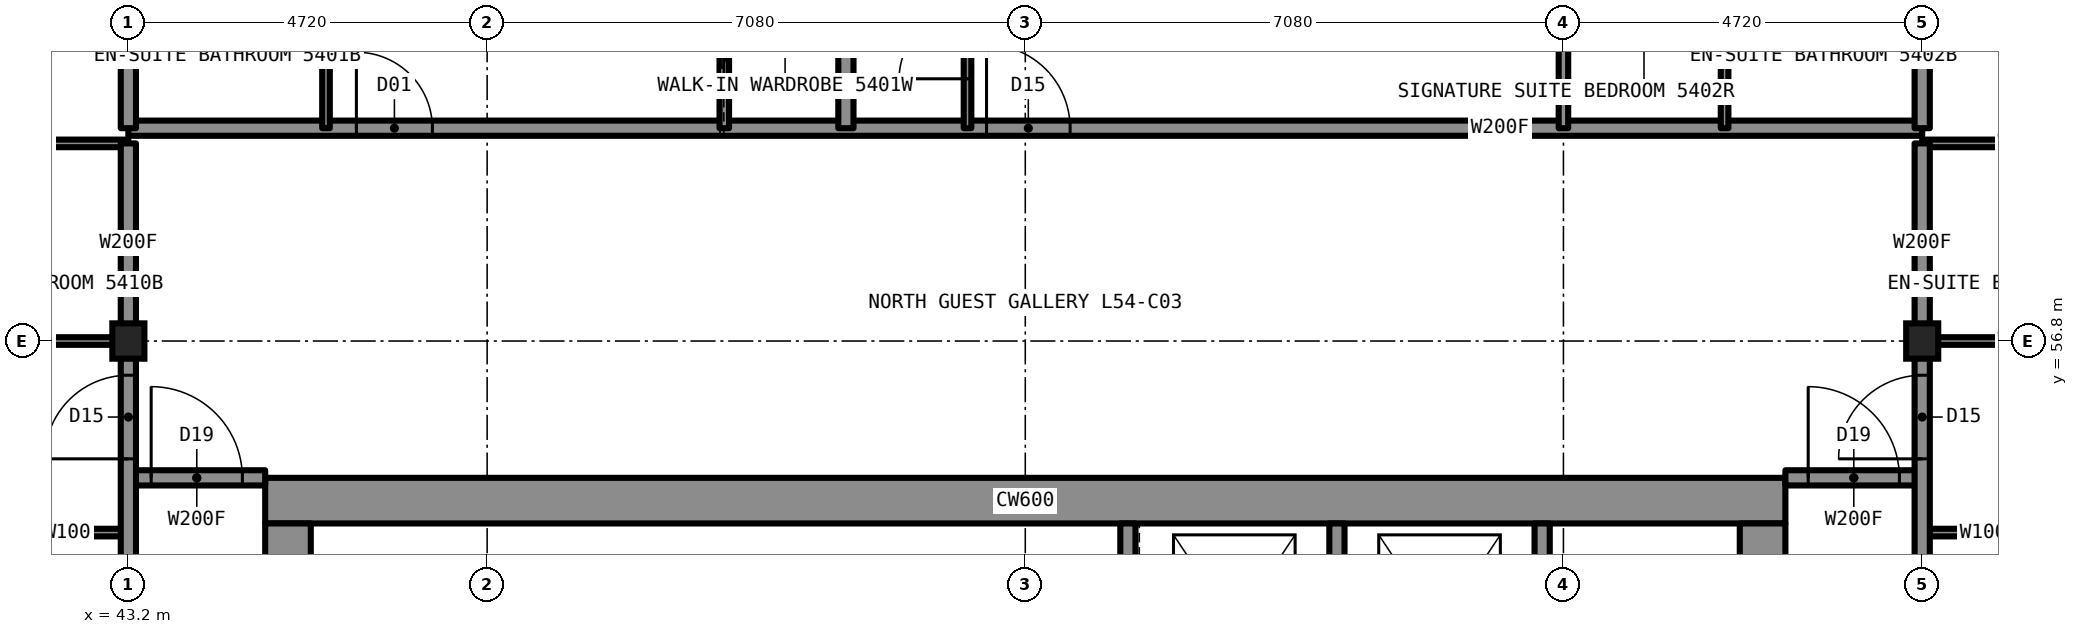
"""IFC4 building model, lengths in metres.
Left out: names, types, materials, properties, quantities, classifications, styles, units other than length and angle.
Written with IfcOpenShell. Run it as: python <this file> out.ifc"""

import sys

from ifc_helpers import new_model, si_unit, direction, frame, frame_2d, origin, origin_2d, place, context, subcontext, project, spatial, rectangle, i_section, extrude, element, fill, save


model = new_model("IFC4")
c1 = context("Model", 3, precision=1e-05, world=origin(), true_north=direction((0.0, 1.0)))
c2 = subcontext(c1, "Body", "Model", "MODEL_VIEW")
j1 = project(units=[si_unit("LENGTHUNIT", "METRE"), si_unit("PLANEANGLEUNIT", "RADIAN")], contexts=[c1])
p1 = place(None, origin())
s1 = spatial("IfcSite", under=j1, at=p1, CompositionType="ELEMENT")
p2 = place(p1, origin())
s2 = spatial("IfcBuilding", under=s1, at=p2, CompositionType="ELEMENT")
p3 = place(p2, frame((0.0, 0.0, 193.3)))
s3 = spatial("IfcBuildingStorey", under=s2, at=p3, CompositionType="ELEMENT", Elevation=193.3)
for number, where, z_axis, x_axis in (
    (1, (43.2, 56.8, 0.0), (0.0, 0.0, 1.0), (1.0, 0.0, 0.0)),
    (2, (66.8, 56.8, 0.0), (0.0, 0.0, 1.0), (1.0, 0.0, 0.0)),
):
    element("IfcColumn", number, at=place(p3, frame(where, z_axis=z_axis, x_axis=x_axis)), inside=s3, PredefinedType="COLUMN", context=c2, shape_type="SweptSolid", body=[
        extrude(i_section(OverallWidth=0.422, OverallDepth=0.465, WebThickness=0.045, FlangeThickness=0.073, at=origin_2d()), origin(), (0.0, 0.0, 1.0), 3.5),
    ])
p4 = place(p3, frame((45.0, 54.7, 0.0), z_axis=(0.0, 0.0, 1.0), x_axis=(1.0, 0.0, 0.0)))
e3 = element("IfcWall", 3, at=p4, inside=s3, PredefinedType="SHEAR", context=c2, shape_type="SweptSolid", body=[
    extrude(rectangle(XDim=20.0, YDim=0.6, at=frame_2d((10.0, 0.0))), origin(), (0.0, 0.0, 1.0), 3.5),
])
p5 = place(p3, frame((64.7, 35.6, 0.0), z_axis=(0.0, 0.0, 1.0), x_axis=(0.0, 1.0, 0.0)))
e4 = element("IfcWall", 4, at=p5, inside=s3, PredefinedType="SHEAR", context=c2, shape_type="SweptSolid", body=[
    extrude(rectangle(XDim=18.8, YDim=0.6, at=frame_2d((9.4, 0.0))), origin(), (0.0, 0.0, 1.0), 3.5),
])
p6 = place(p5, frame((13.4, 0.0, 0.0)))
e5 = element("IfcOpeningElement", 5, at=p6, cuts=e4, PredefinedType="OPENING", context=c2, shape_type="SweptSolid", body=[
    extrude(rectangle(XDim=1.8, YDim=2.2, at=frame_2d((0.9, 1.1))), frame((0.0, 0.31, 0.0), z_axis=(0.0, -1.0, 0.0), x_axis=(1.0, 0.0, 0.0)), (0.0, 0.0, 1.0), 0.62),
])
p7 = place(p5, frame((3.6, 0.0, 0.0)))
e6 = element("IfcOpeningElement", 6, at=p7, cuts=e4, PredefinedType="OPENING", context=c2, shape_type="SweptSolid", body=[
    extrude(rectangle(XDim=1.8, YDim=2.2, at=frame_2d((0.9, 1.1))), frame((0.0, 0.31, 0.0), z_axis=(0.0, -1.0, 0.0), x_axis=(1.0, 0.0, 0.0)), (0.0, 0.0, 1.0), 0.62),
])
p8 = place(p3, frame((45.3, 35.6, 0.0), z_axis=(0.0, 0.0, 1.0), x_axis=(0.0, 1.0, 0.0)))
e7 = element("IfcWall", 7, at=p8, inside=s3, PredefinedType="SHEAR", context=c2, shape_type="SweptSolid", body=[
    extrude(rectangle(XDim=18.8, YDim=0.6, at=frame_2d((9.4, 0.0))), origin(), (0.0, 0.0, 1.0), 3.5),
])
p9 = place(p8, frame((13.4, 0.0, 0.0)))
e8 = element("IfcOpeningElement", 8, at=p9, cuts=e7, PredefinedType="OPENING", context=c2, shape_type="SweptSolid", body=[
    extrude(rectangle(XDim=1.8, YDim=2.2, at=frame_2d((0.9, 1.1))), frame((0.0, 0.31, 0.0), z_axis=(0.0, -1.0, 0.0), x_axis=(1.0, 0.0, 0.0)), (0.0, 0.0, 1.0), 0.62),
])
p10 = place(p8, frame((3.6, 0.0, 0.0)))
e9 = element("IfcOpeningElement", 9, at=p10, cuts=e7, PredefinedType="OPENING", context=c2, shape_type="SweptSolid", body=[
    extrude(rectangle(XDim=1.8, YDim=2.2, at=frame_2d((0.9, 1.1))), frame((0.0, 0.31, 0.0), z_axis=(0.0, -1.0, 0.0), x_axis=(1.0, 0.0, 0.0)), (0.0, 0.0, 1.0), 0.62),
])
p11 = place(p8, frame((6.4, 0.0, 0.0)))
e10 = element("IfcOpeningElement", 10, at=p11, cuts=e7, PredefinedType="OPENING", context=c2, shape_type="SweptSolid", body=[
    extrude(rectangle(XDim=1.2, YDim=2.2, at=frame_2d((0.6, 1.1))), frame((0.0, 0.31, 0.0), z_axis=(0.0, -1.0, 0.0), x_axis=(1.0, 0.0, 0.0)), (0.0, 0.0, 1.0), 0.62),
])
p12 = place(p3, frame((43.2, 55.0, 0.0), z_axis=(0.0, 0.0, 1.0), x_axis=(1.0, 0.0, 0.0)))
e11 = element("IfcWall", 11, at=p12, inside=s3, PredefinedType="PARTITIONING", context=c2, shape_type="SweptSolid", body=[
    extrude(rectangle(XDim=1.8, YDim=0.2, at=frame_2d((0.9, 0.0))), origin(), (0.0, 0.0, 1.0), 3.33),
])
p13 = place(p12, frame((0.3, 0.0, 0.0)))
e12 = element("IfcOpeningElement", 12, at=p13, cuts=e11, PredefinedType="OPENING", context=c2, shape_type="SweptSolid", body=[
    extrude(rectangle(XDim=1.2, YDim=2.2, at=frame_2d((0.6, 1.1))), frame((0.0, 0.11, 0.0), z_axis=(0.0, -1.0, 0.0), x_axis=(1.0, 0.0, 0.0)), (0.0, 0.0, 1.0), 0.22),
])
p14 = place(p3, frame((65.0, 55.0, 0.0), z_axis=(0.0, 0.0, 1.0), x_axis=(1.0, 0.0, 0.0)))
e13 = element("IfcWall", 13, at=p14, inside=s3, PredefinedType="PARTITIONING", context=c2, shape_type="SweptSolid", body=[
    extrude(rectangle(XDim=1.8, YDim=0.2, at=frame_2d((0.9, 0.0))), origin(), (0.0, 0.0, 1.0), 3.33),
])
p15 = place(p14, frame((0.3, 0.0, 0.0)))
e14 = element("IfcOpeningElement", 14, at=p15, cuts=e13, PredefinedType="OPENING", context=c2, shape_type="SweptSolid", body=[
    extrude(rectangle(XDim=1.2, YDim=2.2, at=frame_2d((0.6, 1.1))), frame((0.0, 0.11, 0.0), z_axis=(0.0, -1.0, 0.0), x_axis=(1.0, 0.0, 0.0)), (0.0, 0.0, 1.0), 0.22),
])
for number, where, z_axis, x_axis in (
    (15, (40.6, 56.8, 0.0), (0.0, 0.0, 1.0), (1.0, 0.0, 0.0)),
    (16, (66.8, 56.8, 0.0), (0.0, 0.0, 1.0), (1.0, 0.0, 0.0)),
):
    element("IfcWall", number, at=place(p3, frame(where, z_axis=z_axis, x_axis=x_axis)), inside=s3, PredefinedType="PARTITIONING", context=c2, shape_type="SweptSolid", body=[
        extrude(rectangle(XDim=2.6, YDim=0.1, at=frame_2d((1.3, 0.0))), origin(), (0.0, 0.0, 1.0), 2.573),
    ])
for number, where, z_axis, x_axis in (
    (17, (40.6, 59.4, 0.0), (0.0, 0.0, 1.0), (1.0, 0.0, 0.0)),
    (18, (66.8, 59.4, 0.0), (0.0, 0.0, 1.0), (1.0, 0.0, 0.0)),
):
    element("IfcWall", number, at=place(p3, frame(where, z_axis=z_axis, x_axis=x_axis)), inside=s3, PredefinedType="PARTITIONING", context=c2, shape_type="SweptSolid", body=[
        extrude(rectangle(XDim=2.6, YDim=0.1, at=frame_2d((1.3, 0.0))), origin(), (0.0, 0.0, 1.0), 3.33),
    ])
p16 = place(p3, frame((43.2, 59.6, 0.0), z_axis=(0.0, 0.0, 1.0), x_axis=(1.0, 0.0, 0.0)))
e19 = element("IfcWall", 19, at=p16, inside=s3, PredefinedType="PARTITIONING", context=c2, shape_type="SweptSolid", body=[
    extrude(rectangle(XDim=23.6, YDim=0.2, at=frame_2d((11.8, 0.0))), origin(), (0.0, 0.0, 1.0), 3.33),
])
p17 = place(p16, frame((3.0, 0.0, 0.0)))
e20 = element("IfcOpeningElement", 20, at=p17, cuts=e19, PredefinedType="OPENING", context=c2, shape_type="SweptSolid", body=[
    extrude(rectangle(XDim=1.0, YDim=2.2, at=frame_2d((0.5, 1.1))), frame((0.0, 0.11, 0.0), z_axis=(0.0, -1.0, 0.0), x_axis=(1.0, 0.0, 0.0)), (0.0, 0.0, 1.0), 0.22),
])
p18 = place(p16, frame((11.29, 0.0, 0.0)))
e21 = element("IfcOpeningElement", 21, at=p18, cuts=e19, PredefinedType="OPENING", context=c2, shape_type="SweptSolid", body=[
    extrude(rectangle(XDim=1.1, YDim=2.2, at=frame_2d((0.55, 1.1))), frame((0.0, 0.11, 0.0), z_axis=(0.0, -1.0, 0.0), x_axis=(1.0, 0.0, 0.0)), (0.0, 0.0, 1.0), 0.22),
])
for number, where, z_axis, x_axis in (
    (22, (41.6, 54.28, 0.0), (0.0, 0.0, 1.0), (1.0, 0.0, 0.0)),
    (23, (66.8, 54.28, 0.0), (0.0, 0.0, 1.0), (1.0, 0.0, 0.0)),
):
    element("IfcWall", number, at=place(p3, frame(where, z_axis=z_axis, x_axis=x_axis)), inside=s3, PredefinedType="PARTITIONING", context=c2, shape_type="SweptSolid", body=[
        extrude(rectangle(XDim=1.6, YDim=0.1, at=frame_2d((0.8, 0.0))), origin(), (0.0, 0.0, 1.0), 3.33),
    ])
p19 = place(p3, frame((54.24, 59.6, 0.0), z_axis=(0.0, 0.0, 1.0), x_axis=(0.0, 1.0, 0.0)))
e24 = element("IfcWall", 24, at=p19, inside=s3, PredefinedType="PARTITIONING", context=c2, shape_type="SweptSolid", body=[
    extrude(rectangle(XDim=2.2, YDim=0.1, at=frame_2d((1.1, 0.0))), origin(), (0.0, 0.0, 1.0), 3.33),
])
p20 = place(p19, frame((0.65, 0.0, 0.0)))
e25 = element("IfcOpeningElement", 25, at=p20, cuts=e24, PredefinedType="OPENING", context=c2, shape_type="SweptSolid", body=[
    extrude(rectangle(XDim=0.9, YDim=2.1, at=frame_2d((0.45, 1.05))), frame((0.0, 0.06, 0.0), z_axis=(0.0, -1.0, 0.0), x_axis=(1.0, 0.0, 0.0)), (0.0, 0.0, 1.0), 0.12),
])
p21 = place(p3, frame((43.2, 33.22, 0.0), z_axis=(0.0, 0.0, 1.0), x_axis=(0.0, 1.0, 0.0)))
e26 = element("IfcWall", 26, at=p21, inside=s3, PredefinedType="PARTITIONING", context=c2, shape_type="SweptSolid", body=[
    extrude(rectangle(XDim=23.56, YDim=0.2, at=frame_2d((11.78, 0.0))), origin(), (0.0, 0.0, 1.0), 3.33),
])
p22 = place(p21, frame((7.25, 0.0, 0.0)))
e27 = element("IfcOpeningElement", 27, at=p22, cuts=e26, PredefinedType="OPENING", context=c2, shape_type="SweptSolid", body=[
    extrude(rectangle(XDim=1.0, YDim=2.2, at=frame_2d((0.5, 1.1))), frame((0.0, 0.11, 0.0), z_axis=(0.0, -1.0, 0.0), x_axis=(1.0, 0.0, 0.0)), (0.0, 0.0, 1.0), 0.22),
])
p23 = place(p21, frame((12.42, 0.0, 0.0)))
e28 = element("IfcOpeningElement", 28, at=p23, cuts=e26, PredefinedType="OPENING", context=c2, shape_type="SweptSolid", body=[
    extrude(rectangle(XDim=1.0, YDim=2.2, at=frame_2d((0.5, 1.1))), frame((0.0, 0.11, 0.0), z_axis=(0.0, -1.0, 0.0), x_axis=(1.0, 0.0, 0.0)), (0.0, 0.0, 1.0), 0.22),
])
p24 = place(p21, frame((22.03, 0.0, 0.0)))
e29 = element("IfcOpeningElement", 29, at=p24, cuts=e26, PredefinedType="OPENING", context=c2, shape_type="SweptSolid", body=[
    extrude(rectangle(XDim=1.1, YDim=2.2, at=frame_2d((0.55, 1.1))), frame((0.0, 0.11, 0.0), z_axis=(0.0, -1.0, 0.0), x_axis=(1.0, 0.0, 0.0)), (0.0, 0.0, 1.0), 0.22),
])
p25 = place(p21, frame((0.63, 0.0, 0.0)))
e30 = element("IfcOpeningElement", 30, at=p25, cuts=e26, PredefinedType="OPENING", context=c2, shape_type="SweptSolid", body=[
    extrude(rectangle(XDim=1.1, YDim=2.2, at=frame_2d((0.55, 1.1))), frame((0.0, 0.11, 0.0), z_axis=(0.0, -1.0, 0.0), x_axis=(1.0, 0.0, 0.0)), (0.0, 0.0, 1.0), 0.22),
])
p26 = place(p3, frame((43.2, 59.6, 0.0), z_axis=(0.0, 0.0, 1.0), x_axis=(0.0, 1.0, 0.0)))
e31 = element("IfcWall", 31, at=p26, inside=s3, PredefinedType="PARTITIONING", context=c2, shape_type="SweptSolid", body=[
    extrude(rectangle(XDim=4.4, YDim=0.2, at=frame_2d((2.2, 0.0))), origin(), (0.0, 0.0, 1.0), 2.573),
])
p27 = place(p3, frame((52.64, 59.6, 0.0), z_axis=(0.0, 0.0, 1.0), x_axis=(0.0, 1.0, 0.0)))
e32 = element("IfcWall", 32, at=p27, inside=s3, PredefinedType="PARTITIONING", context=c2, shape_type="SweptSolid", body=[
    extrude(rectangle(XDim=4.4, YDim=0.2, at=frame_2d((2.2, 0.0))), origin(), (0.0, 0.0, 1.0), 3.33),
])
p28 = place(p3, frame((51.04, 59.6, 0.0), z_axis=(0.0, 0.0, 1.0), x_axis=(0.0, 1.0, 0.0)))
e33 = element("IfcWall", 33, at=p28, inside=s3, PredefinedType="PARTITIONING", context=c2, shape_type="SweptSolid", body=[
    extrude(rectangle(XDim=2.2, YDim=0.125, at=frame_2d((1.1, 0.0))), origin(), (0.0, 0.0, 1.0), 3.33),
])
p29 = place(p28, frame((0.7, 0.0, 0.0)))
e34 = element("IfcOpeningElement", 34, at=p29, cuts=e33, PredefinedType="OPENING", context=c2, shape_type="SweptSolid", body=[
    extrude(rectangle(XDim=0.8, YDim=2.1, at=frame_2d((0.4, 1.05))), frame((0.0, 0.073, 0.0), z_axis=(0.0, -1.0, 0.0), x_axis=(1.0, 0.0, 0.0)), (0.0, 0.0, 1.0), 0.145),
])
p30 = place(p3, frame((45.8, 59.6, 0.0), z_axis=(0.0, 0.0, 1.0), x_axis=(0.0, 1.0, 0.0)))
e35 = element("IfcWall", 35, at=p30, inside=s3, PredefinedType="PARTITIONING", context=c2, shape_type="SweptSolid", body=[
    extrude(rectangle(XDim=3.0, YDim=0.1, at=frame_2d((1.5, 0.0))), origin(), (0.0, 0.0, 1.0), 3.33),
])
p31 = place(p30, frame((1.05, 0.0, 0.0)))
e36 = element("IfcOpeningElement", 36, at=p31, cuts=e35, PredefinedType="OPENING", context=c2, shape_type="SweptSolid", body=[
    extrude(rectangle(XDim=0.9, YDim=2.1, at=frame_2d((0.45, 1.05))), frame((0.0, 0.06, 0.0), z_axis=(0.0, -1.0, 0.0), x_axis=(1.0, 0.0, 0.0)), (0.0, 0.0, 1.0), 0.12),
])
p32 = place(p3, frame((66.8, 33.22, 0.0), z_axis=(0.0, 0.0, 1.0), x_axis=(0.0, 1.0, 0.0)))
e37 = element("IfcWall", 37, at=p32, inside=s3, PredefinedType="PARTITIONING", context=c2, shape_type="SweptSolid", body=[
    extrude(rectangle(XDim=23.56, YDim=0.2, at=frame_2d((11.78, 0.0))), origin(), (0.0, 0.0, 1.0), 3.33),
])
p33 = place(p32, frame((7.85, 0.0, 0.0)))
e38 = element("IfcOpeningElement", 38, at=p33, cuts=e37, PredefinedType="OPENING", context=c2, shape_type="SweptSolid", body=[
    extrude(rectangle(XDim=1.0, YDim=2.2, at=frame_2d((0.5, 1.1))), frame((0.0, 0.11, 0.0), z_axis=(0.0, -1.0, 0.0), x_axis=(1.0, 0.0, 0.0)), (0.0, 0.0, 1.0), 0.22),
])
p34 = place(p32, frame((12.42, 0.0, 0.0)))
e39 = element("IfcOpeningElement", 39, at=p34, cuts=e37, PredefinedType="OPENING", context=c2, shape_type="SweptSolid", body=[
    extrude(rectangle(XDim=1.0, YDim=2.2, at=frame_2d((0.5, 1.1))), frame((0.0, 0.11, 0.0), z_axis=(0.0, -1.0, 0.0), x_axis=(1.0, 0.0, 0.0)), (0.0, 0.0, 1.0), 0.22),
])
p35 = place(p32, frame((22.03, 0.0, 0.0)))
e40 = element("IfcOpeningElement", 40, at=p35, cuts=e37, PredefinedType="OPENING", context=c2, shape_type="SweptSolid", body=[
    extrude(rectangle(XDim=1.1, YDim=2.2, at=frame_2d((0.55, 1.1))), frame((0.0, 0.11, 0.0), z_axis=(0.0, -1.0, 0.0), x_axis=(1.0, 0.0, 0.0)), (0.0, 0.0, 1.0), 0.22),
])
p36 = place(p32, frame((0.63, 0.0, 0.0)))
e41 = element("IfcOpeningElement", 41, at=p36, cuts=e37, PredefinedType="OPENING", context=c2, shape_type="SweptSolid", body=[
    extrude(rectangle(XDim=1.1, YDim=2.2, at=frame_2d((0.55, 1.1))), frame((0.0, 0.11, 0.0), z_axis=(0.0, -1.0, 0.0), x_axis=(1.0, 0.0, 0.0)), (0.0, 0.0, 1.0), 0.22),
])
p37 = place(p3, frame((66.8, 59.6, 0.0), z_axis=(0.0, 0.0, 1.0), x_axis=(0.0, 1.0, 0.0)))
e42 = element("IfcWall", 42, at=p37, inside=s3, PredefinedType="PARTITIONING", context=c2, shape_type="SweptSolid", body=[
    extrude(rectangle(XDim=4.4, YDim=0.2, at=frame_2d((2.2, 0.0))), origin(), (0.0, 0.0, 1.0), 2.573),
])
p38 = place(p3, frame((62.08, 59.6, 0.0), z_axis=(0.0, 0.0, 1.0), x_axis=(0.0, 1.0, 0.0)))
e43 = element("IfcWall", 43, at=p38, inside=s3, PredefinedType="PARTITIONING", context=c2, shape_type="SweptSolid", body=[
    extrude(rectangle(XDim=4.4, YDim=0.125, at=frame_2d((2.2, 0.0))), origin(), (0.0, 0.0, 1.0), 2.573),
])
p39 = place(p38, frame((2.8, 0.0, 0.0)))
e44 = element("IfcOpeningElement", 44, at=p39, cuts=e43, PredefinedType="OPENING", context=c2, shape_type="SweptSolid", body=[
    extrude(rectangle(XDim=0.9, YDim=2.2, at=frame_2d((0.45, 1.1))), frame((0.0, 0.073, 0.0), z_axis=(0.0, -1.0, 0.0), x_axis=(1.0, 0.0, 0.0)), (0.0, 0.0, 1.0), 0.145),
])
p40 = place(p3, frame((64.2, 59.6, 0.0), z_axis=(0.0, 0.0, 1.0), x_axis=(0.0, 1.0, 0.0)))
e45 = element("IfcWall", 45, at=p40, inside=s3, PredefinedType="PARTITIONING", context=c2, shape_type="SweptSolid", body=[
    extrude(rectangle(XDim=3.0, YDim=0.1, at=frame_2d((1.5, 0.0))), origin(), (0.0, 0.0, 1.0), 3.33),
])
for number, where, z_axis, x_axis in (
    (46, (59.1, 51.7, 0.0), (0.0, 0.0, 1.0), (0.0, 1.0, 0.0)),
    (47, (61.8, 51.7, 0.0), (0.0, 0.0, 1.0), (0.0, 1.0, 0.0)),
    (48, (56.35, 51.7, 0.0), (0.0, 0.0, 1.0), (0.0, 1.0, 0.0)),
):
    element("IfcWall", number, at=place(p3, frame(where, z_axis=z_axis, x_axis=x_axis)), inside=s3, PredefinedType="PARTITIONING", context=c2, shape_type="SweptSolid", body=[
        extrude(rectangle(XDim=2.7, YDim=0.2, at=frame_2d((1.35, 0.0))), origin(), (0.0, 0.0, 1.0), 3.33),
    ])
for number, where, z_axis, x_axis in (
    (49, (43.2, 56.78, 0.0), (0.0, 0.0, 1.0), (0.0, 1.0, 0.0)),
    (50, (66.8, 56.78, 0.0), (0.0, 0.0, 1.0), (0.0, 1.0, 0.0)),
):
    element("IfcWall", number, at=place(p3, frame(where, z_axis=z_axis, x_axis=x_axis)), inside=s3, PredefinedType="PARTITIONING", context=c2, shape_type="SweptSolid", body=[
        extrude(rectangle(XDim=2.62, YDim=0.2, at=frame_2d((1.31, 0.0))), origin(), (0.0, 0.0, 1.0), 2.573),
    ])
p41 = place(p13, origin())
e51 = element("IfcDoor", 51, at=p41, inside=s3, OperationType="SINGLE_SWING_LEFT", PredefinedType="DOOR", context=c2, shape_type="SweptSolid", body=[
    extrude(rectangle(XDim=1.2, YDim=2.2, at=frame_2d((0.6, 1.1))), frame((0.0, 0.025, 0.0), z_axis=(0.0, -1.0, 0.0), x_axis=(1.0, 0.0, 0.0)), (0.0, 0.0, 1.0), 0.05),
])
fill(e12, e51)
p42 = place(p15, origin())
e52 = element("IfcDoor", 52, at=p42, inside=s3, OperationType="SINGLE_SWING_LEFT", PredefinedType="DOOR", context=c2, shape_type="SweptSolid", body=[
    extrude(rectangle(XDim=1.2, YDim=2.2, at=frame_2d((0.6, 1.1))), frame((0.0, 0.025, 0.0), z_axis=(0.0, -1.0, 0.0), x_axis=(1.0, 0.0, 0.0)), (0.0, 0.0, 1.0), 0.05),
])
fill(e14, e52)
p43 = place(p17, origin())
e53 = element("IfcDoor", 53, at=p43, inside=s3, OperationType="SINGLE_SWING_LEFT", PredefinedType="DOOR", context=c2, shape_type="SweptSolid", body=[
    extrude(rectangle(XDim=1.0, YDim=2.2, at=frame_2d((0.5, 1.1))), frame((0.0, 0.025, 0.0), z_axis=(0.0, -1.0, 0.0), x_axis=(1.0, 0.0, 0.0)), (0.0, 0.0, 1.0), 0.05),
])
fill(e20, e53)
p44 = place(p29, origin())
e54 = element("IfcDoor", 54, at=p44, inside=s3, OperationType="SLIDING_TO_LEFT", PredefinedType="DOOR", context=c2, shape_type="SweptSolid", body=[
    extrude(rectangle(XDim=0.8, YDim=2.1, at=frame_2d((0.4, 1.05))), frame((0.0, 0.025, 0.0), z_axis=(0.0, -1.0, 0.0), x_axis=(1.0, 0.0, 0.0)), (0.0, 0.0, 1.0), 0.05),
])
fill(e34, e54)
p45 = place(p18, origin())
e55 = element("IfcDoor", 55, at=p45, inside=s3, OperationType="SINGLE_SWING_LEFT", PredefinedType="DOOR", context=c2, shape_type="SweptSolid", body=[
    extrude(rectangle(XDim=1.1, YDim=2.2, at=frame_2d((0.55, 1.1))), frame((0.0, 0.025, 0.0), z_axis=(0.0, -1.0, 0.0), x_axis=(1.0, 0.0, 0.0)), (0.0, 0.0, 1.0), 0.05),
])
fill(e21, e55)
p46 = place(p20, origin())
e56 = element("IfcDoor", 56, at=p46, inside=s3, OperationType="SINGLE_SWING_LEFT", PredefinedType="DOOR", context=c2, shape_type="SweptSolid", body=[
    extrude(rectangle(XDim=0.9, YDim=2.1, at=frame_2d((0.45, 1.05))), frame((0.0, 0.025, 0.0), z_axis=(0.0, -1.0, 0.0), x_axis=(1.0, 0.0, 0.0)), (0.0, 0.0, 1.0), 0.05),
])
fill(e25, e56)
p47 = place(p35, origin())
e57 = element("IfcDoor", 57, at=p47, inside=s3, OperationType="SINGLE_SWING_LEFT", PredefinedType="DOOR", context=c2, shape_type="SweptSolid", body=[
    extrude(rectangle(XDim=1.1, YDim=2.2, at=frame_2d((0.55, 1.1))), frame((0.0, 0.025, 0.0), z_axis=(0.0, -1.0, 0.0), x_axis=(1.0, 0.0, 0.0)), (0.0, 0.0, 1.0), 0.05),
])
fill(e40, e57)
p48 = place(p24, origin())
e58 = element("IfcDoor", 58, at=p48, inside=s3, OperationType="SINGLE_SWING_LEFT", PredefinedType="DOOR", context=c2, shape_type="SweptSolid", body=[
    extrude(rectangle(XDim=1.1, YDim=2.2, at=frame_2d((0.55, 1.1))), frame((0.0, 0.025, 0.0), z_axis=(0.0, -1.0, 0.0), x_axis=(1.0, 0.0, 0.0)), (0.0, 0.0, 1.0), 0.05),
])
fill(e29, e58)
save(model, sys.argv[1])
